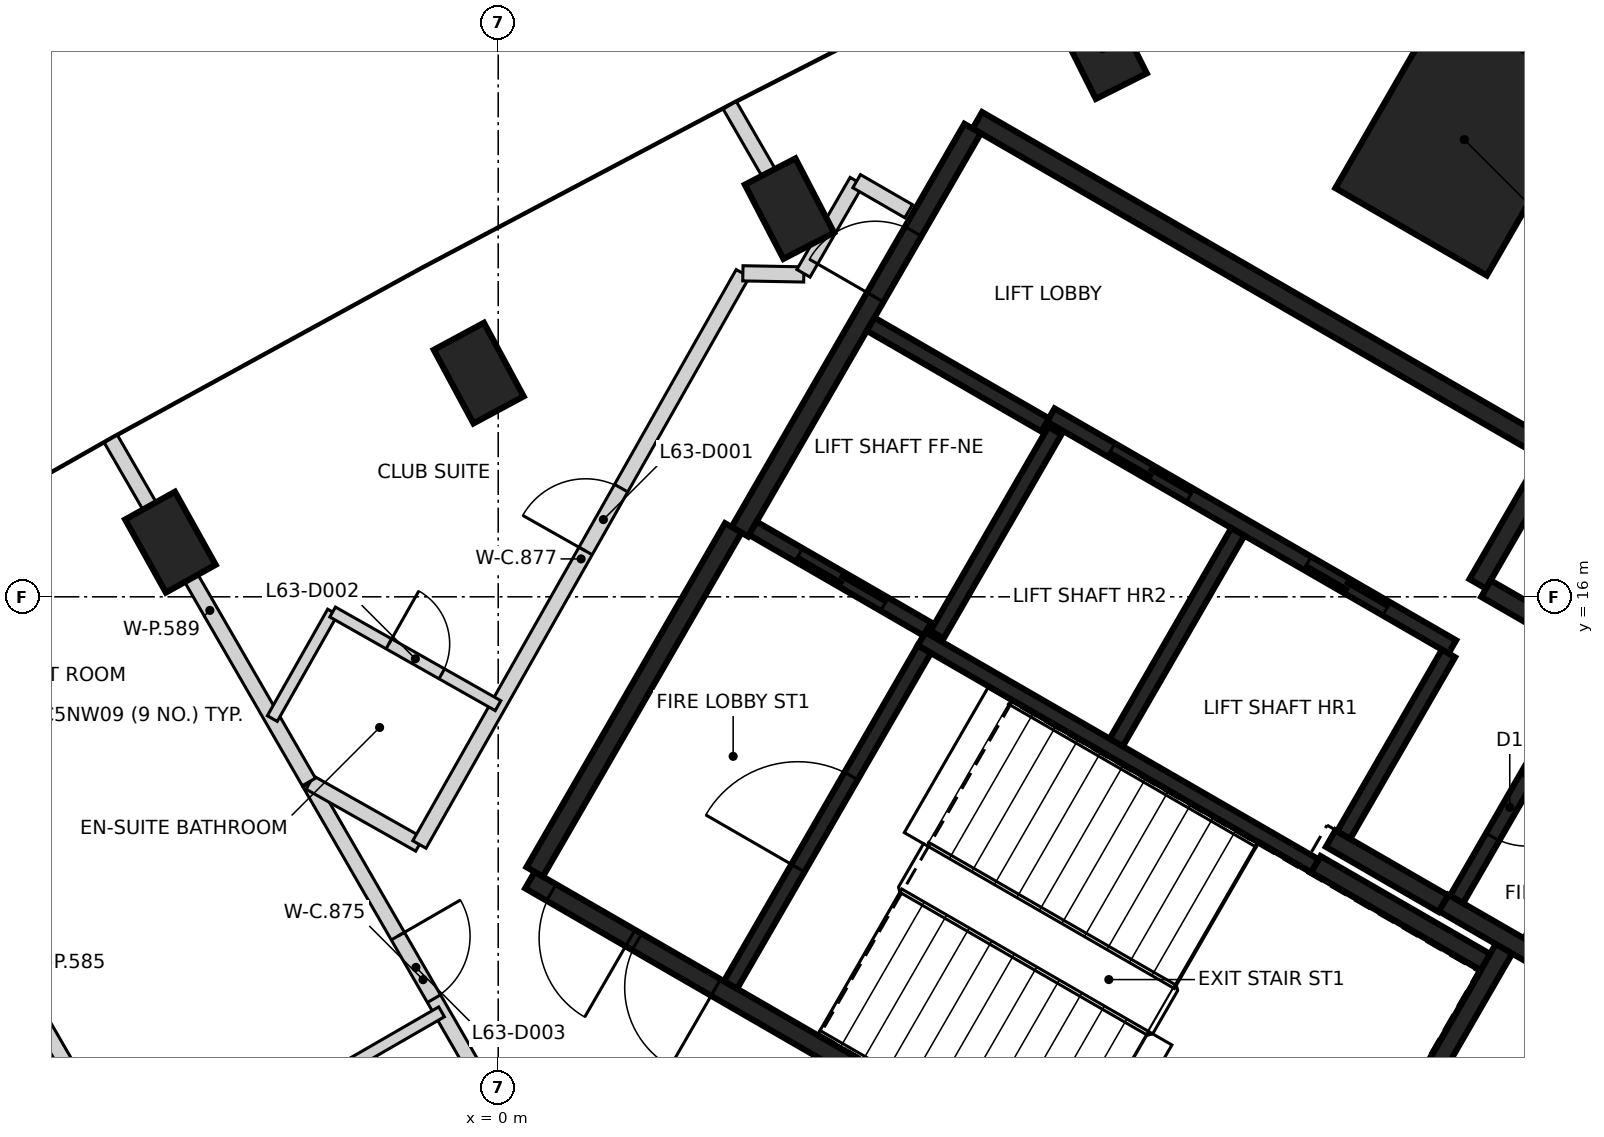
"""IFC4 building model, lengths in metres.
Left out: names, types, materials, properties, quantities, classifications, styles, units other than length and angle.
Written with IfcOpenShell. Run it as: python <this file> out.ifc"""

import sys

from ifc_helpers import new_model, si_unit, direction, frame, frame_2d, origin, origin_2d, place, context, subcontext, project, spatial, rectangle, extrude, element, fill, save


model = new_model("IFC4")
c1 = context("Model", 3, precision=1e-05, world=origin(), true_north=direction((0.0, 1.0)))
c2 = subcontext(c1, "Body", "Model", "MODEL_VIEW")
j1 = project(units=[si_unit("LENGTHUNIT", "METRE"), si_unit("PLANEANGLEUNIT", "RADIAN")], contexts=[c1])
p1 = place(None, origin())
s1 = spatial("IfcSite", under=j1, at=p1, CompositionType="ELEMENT")
p2 = place(p1, origin())
s2 = spatial("IfcBuilding", under=s1, at=p2, CompositionType="ELEMENT")
p3 = place(p2, frame((0.0, 0.0, 250.2)))
s3 = spatial("IfcBuildingStorey", under=s2, at=p3, CompositionType="ELEMENT", Elevation=250.2)
for number, where, z_axis, x_axis in (
    (1, (7.951, 23.211, -0.35), (0.0, 0.0, 1.0), (-0.449, 0.894, 0.0)),
    (2, (3.832, 21.107, -0.35), (0.0, 0.0, 1.0), (-0.461, 0.887, 0.0)),
    (3, (-0.256, 18.943, -0.35), (0.0, 0.0, 1.0), (-0.475, 0.88, 0.0)),
    (4, (-4.312, 16.719, -0.35), (0.0, 0.0, 1.0), (-0.487, 0.873, 0.0)),
):
    element("IfcColumn", number, at=place(p3, frame(where, z_axis=z_axis, x_axis=x_axis)), inside=s3, PredefinedType="COLUMN", context=c2, shape_type="SweptSolid", body=[
        extrude(rectangle(XDim=1.1, YDim=0.75, at=origin_2d()), origin(), (0.0, 0.0, 1.0), 3.6),
    ])
p4 = place(p3, frame((12.71, 22.015, -0.35), z_axis=(0.0, 0.0, 1.0), x_axis=(0.5, 0.866025403784, 0.0)))
e5 = element("IfcColumn", 5, at=p4, inside=s3, PredefinedType="COLUMN", context=c2, shape_type="SweptSolid", body=[
    extrude(rectangle(XDim=2.8, YDim=2.3, at=origin_2d()), origin(), (0.0, 0.0, 1.0), 3.6),
])
p5 = place(p3, frame((10.42, 6.498, 0.0), z_axis=(0.0, 0.0, 1.0), x_axis=(-0.866021906294, 0.500006057782, 0.0)))
e6 = element("IfcWall", 6, at=p5, inside=s3, PredefinedType="SHEAR", context=c2, shape_type="SweptSolid", body=[
    extrude(rectangle(XDim=11.55, YDim=0.25, at=frame_2d((5.775, 0.0))), origin(), (0.0, 0.0, 1.0), 3.25),
])
p6 = place(p5, frame((10.025, 0.0, 0.0)))
e7 = element("IfcOpeningElement", 7, at=p6, cuts=e6, PredefinedType="OPENING", context=c2, shape_type="SweptSolid", body=[
    extrude(rectangle(XDim=1.2, YDim=2.1, at=frame_2d((0.6, 1.05))), frame((0.0, 0.135, 0.0), z_axis=(0.0, -1.0, 0.0), x_axis=(1.0, 0.0, 0.0)), (0.0, 0.0, 1.0), 0.27),
])
p7 = place(p5, frame((8.725, 0.0, 0.0)))
e8 = element("IfcOpeningElement", 8, at=p7, cuts=e6, PredefinedType="OPENING", context=c2, shape_type="SweptSolid", body=[
    extrude(rectangle(XDim=1.2, YDim=2.1, at=frame_2d((0.6, 1.05))), frame((0.0, 0.135, 0.0), z_axis=(0.0, -1.0, 0.0), x_axis=(1.0, 0.0, 0.0)), (0.0, 0.0, 1.0), 0.27),
])
p8 = place(p3, frame((6.304, 22.269, 0.0), z_axis=(0.0, 0.0, 1.0), x_axis=(0.866022959057, -0.500004234368, 0.0)))
e9 = element("IfcWall", 9, at=p8, inside=s3, PredefinedType="SHEAR", context=c2, shape_type="SweptSolid", body=[
    extrude(rectangle(XDim=8.75, YDim=0.25, at=frame_2d((4.375, 0.0))), origin(), (0.0, 0.0, 1.0), 3.25),
])
p9 = place(p3, frame((3.179, 16.856, 0.0), z_axis=(0.0, 0.0, 1.0), x_axis=(0.500001955336, 0.866024274868, 0.0)))
e10 = element("IfcWall", 10, at=p9, inside=s3, PredefinedType="SHEAR", context=c2, shape_type="SweptSolid", body=[
    extrude(rectangle(XDim=6.125, YDim=0.25, at=frame_2d((3.062, 0.0))), origin(), (0.0, 0.0, 1.0), 3.25),
])
p10 = place(p9, frame((3.563, 0.0, 0.0)))
e11 = element("IfcOpeningElement", 11, at=p10, cuts=e10, PredefinedType="OPENING", context=c2, shape_type="SweptSolid", body=[
    extrude(rectangle(XDim=1.0, YDim=2.1, at=frame_2d((0.5, 1.05))), frame((0.0, 0.135, 0.0), z_axis=(0.0, -1.0, 0.0), x_axis=(1.0, 0.0, 0.0)), (0.0, 0.0, 1.0), 0.27),
])
p11 = place(p3, frame((0.48, 12.381, 0.0), z_axis=(0.0, 0.0, 1.0), x_axis=(0.49999885962, 0.866026062182, 0.0)))
e12 = element("IfcWall", 12, at=p11, inside=s3, PredefinedType="SHEAR", context=c2, shape_type="SweptSolid", body=[
    extrude(rectangle(XDim=5.225, YDim=0.25, at=frame_2d((2.612, 0.0))), origin(), (0.0, 0.0, 1.0), 3.25),
])
p12 = place(p3, frame((13.238, 11.378, 0.0), z_axis=(0.0, 0.0, 1.0), x_axis=(-0.500008851346, -0.866020293397, 0.0)))
e13 = element("IfcWall", 13, at=p12, inside=s3, PredefinedType="SHEAR", context=c2, shape_type="SweptSolid", body=[
    extrude(rectangle(XDim=5.51, YDim=0.25, at=frame_2d((2.755, 0.0))), origin(), (0.0, 0.0, 1.0), 3.25),
])
p13 = place(p3, frame((14.918, 10.54, 0.0), z_axis=(0.0, 0.0, 1.0), x_axis=(-0.866063538972, 0.499933942099, 0.0)))
e14 = element("IfcWall", 14, at=p13, inside=s3, PredefinedType="SHEAR", context=c2, shape_type="SweptSolid", body=[
    extrude(rectangle(XDim=2.865, YDim=0.25, at=frame_2d((1.432, 0.0))), origin(), (0.0, 0.0, 1.0), 3.25),
])
p14 = place(p3, frame((10.757, 12.481, 0.0), z_axis=(0.0, 0.0, 1.0), x_axis=(0.866022940537, -0.500004266446, 0.0)))
e15 = element("IfcWall", 15, at=p14, inside=s3, PredefinedType="SHEAR", context=c2, shape_type="SweptSolid", body=[
    extrude(rectangle(XDim=2.575, YDim=0.25, at=frame_2d((1.287, 0.0))), origin(), (0.0, 0.0, 1.0), 3.25),
])
p15 = place(p3, frame((13.819, 17.785, 0.0), z_axis=(0.0, 0.0, 1.0), x_axis=(-0.500039802285, -0.866002422705, 0.0)))
e16 = element("IfcWall", 16, at=p15, inside=s3, PredefinedType="SHEAR", context=c2, shape_type="SweptSolid", body=[
    extrude(rectangle(XDim=1.865, YDim=0.25, at=frame_2d((0.932, 0.0))), origin(), (0.0, 0.0, 1.0), 3.25),
])
p16 = place(p3, frame((12.433, 11.964, 0.0), z_axis=(0.0, 0.0, 1.0), x_axis=(-0.866038183914, 0.499977863513, 0.0)))
e17 = element("IfcWall", 17, at=p16, inside=s3, PredefinedType="SHEAR", context=c2, shape_type="SweptSolid", body=[
    extrude(rectangle(XDim=1.71, YDim=0.25, at=frame_2d((0.855, 0.0))), origin(), (0.0, 0.0, 1.0), 3.25),
])
p17 = place(p3, frame((12.995, 16.108, 0.0), z_axis=(0.0, 0.0, 1.0), x_axis=(0.866044474677, -0.49996696679, 0.0)))
e18 = element("IfcWall", 18, at=p17, inside=s3, PredefinedType="SHEAR", context=c2, shape_type="SweptSolid", body=[
    extrude(rectangle(XDim=1.584, YDim=0.25, at=frame_2d((0.792, 0.0))), origin(), (0.0, 0.0, 1.0), 3.25),
])
p18 = place(p3, frame((12.552, 15.342, 0.0), z_axis=(0.0, 0.0, 1.0), x_axis=(-0.866030299012, 0.499991521122, 0.0)))
e19 = element("IfcWall", 19, at=p18, inside=s3, PredefinedType="SHEAR", context=c2, shape_type="SweptSolid", body=[
    extrude(rectangle(XDim=6.1, YDim=0.2, at=frame_2d((3.05, 0.0))), origin(), (0.0, 0.0, 1.0), 3.25),
])
p19 = place(p18, frame((1.0, 0.0, 0.0)))
e20 = element("IfcOpeningElement", 20, at=p19, cuts=e19, PredefinedType="OPENING", context=c2, shape_type="SweptSolid", body=[
    extrude(rectangle(XDim=1.2, YDim=2.1, at=frame_2d((0.6, 1.05))), frame((0.0, 0.11, 0.0), z_axis=(0.0, -1.0, 0.0), x_axis=(1.0, 0.0, 0.0)), (0.0, 0.0, 1.0), 0.22),
])
p20 = place(p18, frame((3.982, 0.0, 0.0)))
e21 = element("IfcOpeningElement", 21, at=p20, cuts=e19, PredefinedType="OPENING", context=c2, shape_type="SweptSolid", body=[
    extrude(rectangle(XDim=1.2, YDim=2.1, at=frame_2d((0.6, 1.05))), frame((0.0, 0.11, 0.0), z_axis=(0.0, -1.0, 0.0), x_axis=(1.0, 0.0, 0.0)), (0.0, 0.0, 1.0), 0.22),
])
p21 = place(p3, frame((10.743, 12.46, 0.0), z_axis=(0.0, 0.0, 1.0), x_axis=(-0.866018848283, 0.500011354289, 0.0)))
e22 = element("IfcWall", 22, at=p21, inside=s3, PredefinedType="SHEAR", context=c2, shape_type="SweptSolid", body=[
    extrude(rectangle(XDim=5.974, YDim=0.2, at=frame_2d((2.987, 0.0))), origin(), (0.0, 0.0, 1.0), 3.25),
])
p22 = place(p3, frame((3.057, 10.895, 0.0), z_axis=(0.0, 0.0, 1.0), x_axis=(0.500027839223, 0.866009330205, 0.0)))
e23 = element("IfcWall", 23, at=p22, inside=s3, PredefinedType="SHEAR", context=c2, shape_type="SweptSolid", body=[
    extrude(rectangle(XDim=5.098, YDim=0.2, at=frame_2d((2.549, 0.0))), origin(), (0.0, 0.0, 1.0), 3.25),
])
p23 = place(p22, frame((1.774, 0.0, 0.0)))
e24 = element("IfcOpeningElement", 24, at=p23, cuts=e23, PredefinedType="OPENING", context=c2, shape_type="SweptSolid", body=[
    extrude(rectangle(XDim=1.4, YDim=2.1, at=frame_2d((0.7, 1.05))), frame((0.0, 0.11, 0.0), z_axis=(0.0, -1.0, 0.0), x_axis=(1.0, 0.0, 0.0)), (0.0, 0.0, 1.0), 0.22),
])
p24 = place(p3, frame((8.132, 14.084, 0.0), z_axis=(0.0, 0.0, 1.0), x_axis=(0.500030834389, 0.86600760081, 0.0)))
e25 = element("IfcWall", 25, at=p24, inside=s3, PredefinedType="SHEAR", context=c2, shape_type="SweptSolid", body=[
    extrude(rectangle(XDim=3.198, YDim=0.2, at=frame_2d((1.599, 0.0))), origin(), (0.0, 0.0, 1.0), 3.25),
])
p25 = place(p3, frame((14.008, 14.442, 0.0), z_axis=(0.0, 0.0, 1.0), x_axis=(-0.499986818241, -0.866033014143, 0.0)))
e26 = element("IfcWall", 26, at=p25, inside=s3, PredefinedType="SHEAR", context=c2, shape_type="SweptSolid", body=[
    extrude(rectangle(XDim=2.798, YDim=0.2, at=frame_2d((1.399, 0.0))), origin(), (0.0, 0.0, 1.0), 3.25),
])
p26 = place(p25, frame((0.949, 0.0, 0.0)))
e27 = element("IfcOpeningElement", 27, at=p26, cuts=e26, PredefinedType="OPENING", context=c2, shape_type="SweptSolid", body=[
    extrude(rectangle(XDim=0.9, YDim=2.1, at=frame_2d((0.45, 1.05))), frame((0.0, 0.11, 0.0), z_axis=(0.0, -1.0, 0.0), x_axis=(1.0, 0.0, 0.0)), (0.0, 0.0, 1.0), 0.22),
])
p27 = place(p3, frame((12.502, 15.255, 0.0), z_axis=(0.0, 0.0, 1.0), x_axis=(-0.499965018551, -0.866045599391, 0.0)))
e28 = element("IfcWall", 28, at=p27, inside=s3, PredefinedType="SHEAR", context=c2, shape_type="SweptSolid", body=[
    extrude(rectangle(XDim=2.759, YDim=0.2, at=frame_2d((1.379, 0.0))), origin(), (0.0, 0.0, 1.0), 3.25),
])
p28 = place(p3, frame((7.324, 18.187, 0.0), z_axis=(0.0, 0.0, 1.0), x_axis=(-0.499967891604, -0.866043940782, 0.0)))
e29 = element("IfcWall", 29, at=p28, inside=s3, PredefinedType="SHEAR", context=c2, shape_type="SweptSolid", body=[
    extrude(rectangle(XDim=3.1, YDim=0.2, at=frame_2d((1.55, 0.0))), origin(), (0.0, 0.0, 1.0), 3.25),
])
p29 = place(p3, frame((5.646, 15.576, 0.0), z_axis=(0.0, 0.0, 1.0), x_axis=(-0.866018407898, 0.500012117035, 0.0)))
e30 = element("IfcWall", 30, at=p29, inside=s3, PredefinedType="SHEAR", context=c2, shape_type="SweptSolid", body=[
    extrude(rectangle(XDim=2.651, YDim=0.2, at=frame_2d((1.325, 0.0))), origin(), (0.0, 0.0, 1.0), 3.25),
])
p30 = place(p29, frame((0.652, 0.0, 0.0)))
e31 = element("IfcOpeningElement", 31, at=p30, cuts=e30, PredefinedType="OPENING", context=c2, shape_type="SweptSolid", body=[
    extrude(rectangle(XDim=1.3, YDim=2.1, at=frame_2d((0.65, 1.05))), frame((0.0, 0.11, 0.0), z_axis=(0.0, -1.0, 0.0), x_axis=(1.0, 0.0, 0.0)), (0.0, 0.0, 1.0), 0.22),
])
p31 = place(p3, frame((7.196, 18.26, 0.0), z_axis=(0.0, 0.0, 1.0), x_axis=(-0.866018407898, 0.500012117035, 0.0)))
e32 = element("IfcWall", 32, at=p31, inside=s3, PredefinedType="SHEAR", context=c2, shape_type="SweptSolid", body=[
    extrude(rectangle(XDim=2.651, YDim=0.2, at=frame_2d((1.325, 0.0))), origin(), (0.0, 0.0, 1.0), 3.25),
])
p32 = place(p3, frame((-2.483, 13.551, 0.0), z_axis=(0.0, 0.0, 1.0), x_axis=(0.499878046143, -0.866095802429, 0.0)))
e33 = element("IfcWall", 33, at=p32, inside=s3, PredefinedType="PARTITIONING", context=c2, shape_type="SweptSolid", body=[
    extrude(rectangle(XDim=5.977, YDim=0.2, at=frame_2d((2.988, 0.0))), origin(), (0.0, 0.0, 1.0), 3.25),
])
p33 = place(p32, frame((2.327, 0.0, 0.0)))
e34 = element("IfcOpeningElement", 34, at=p33, cuts=e33, PredefinedType="OPENING", context=c2, shape_type="SweptSolid", body=[
    extrude(rectangle(XDim=0.95, YDim=2.1, at=frame_2d((0.475, 1.05))), frame((0.0, 0.11, 0.0), z_axis=(0.0, -1.0, 0.0), x_axis=(1.0, 0.0, 0.0)), (0.0, 0.0, 1.0), 0.22),
])
p34 = place(p3, frame((-2.478, 13.556, 0.0), z_axis=(0.0, 0.0, 1.0), x_axis=(0.870609500021, -0.491974692919, 0.0)))
e35 = element("IfcWall", 35, at=p34, inside=s3, PredefinedType="PARTITIONING", context=c2, shape_type="SweptSolid", body=[
    extrude(rectangle(XDim=1.656, YDim=0.2, at=frame_2d((0.828, 0.0))), origin(), (0.0, 0.0, 1.0), 3.25),
])
p35 = place(p3, frame((-1.037, 12.741, 0.0), z_axis=(0.0, 0.0, 1.0), x_axis=(0.492679417867, 0.870210888929, 0.0)))
e36 = element("IfcWall", 36, at=p35, inside=s3, PredefinedType="PARTITIONING", context=c2, shape_type="SweptSolid", body=[
    extrude(rectangle(XDim=8.636, YDim=0.2, at=frame_2d((4.318, 0.0))), origin(), (0.0, 0.0, 1.0), 3.25),
])
p36 = place(p35, frame((4.438, 0.0, 0.0)))
e37 = element("IfcOpeningElement", 37, at=p36, cuts=e36, PredefinedType="OPENING", context=c2, shape_type="SweptSolid", body=[
    extrude(rectangle(XDim=0.95, YDim=2.1, at=frame_2d((0.475, 1.05))), frame((0.0, 0.11, 0.0), z_axis=(0.0, -1.0, 0.0), x_axis=(1.0, 0.0, 0.0)), (0.0, 0.0, 1.0), 0.22),
])
p37 = place(p3, frame((3.219, 20.256, 0.0), z_axis=(0.0, 0.0, 1.0), x_axis=(0.999821939894, -0.018870307541, 0.0)))
e38 = element("IfcWall", 38, at=p37, inside=s3, PredefinedType="PARTITIONING", context=c2, shape_type="SweptSolid", body=[
    extrude(rectangle(XDim=0.802, YDim=0.2, at=frame_2d((0.401, 0.0))), origin(), (0.0, 0.0, 1.0), 3.25),
])
p38 = place(p3, frame((4.016, 20.256, 0.0), z_axis=(0.0, 0.0, 1.0), x_axis=(0.500135180047, 0.865947343479, 0.0)))
e39 = element("IfcWall", 39, at=p38, inside=s3, PredefinedType="PARTITIONING", context=c2, shape_type="SweptSolid", body=[
    extrude(rectangle(XDim=1.399, YDim=0.2, at=frame_2d((0.7, 0.0))), origin(), (0.0, 0.0, 1.0), 2.35),
])
p39 = place(p3, frame((4.716, 21.468, 0.0), z_axis=(0.0, 0.0, 1.0), x_axis=(0.865912682783, -0.500195187698, 0.0)))
e40 = element("IfcWall", 40, at=p39, inside=s3, PredefinedType="PARTITIONING", context=c2, shape_type="SweptSolid", body=[
    extrude(rectangle(XDim=0.79, YDim=0.2, at=frame_2d((0.395, 0.0))), origin(), (0.0, 0.0, 1.0), 2.35),
])
p40 = place(p3, frame((-9.119, 15.795, 0.0), z_axis=(0.0, 0.0, 1.0), x_axis=(0.500015176972, -0.866016641178, 0.0)))
e41 = element("IfcWall", 41, at=p40, inside=s3, PredefinedType="PARTITIONING", context=c2, shape_type="SweptSolid", body=[
    extrude(rectangle(XDim=11.239, YDim=0.2, at=frame_2d((5.619, 0.0))), origin(), (0.0, 0.0, 1.0), 3.25),
])
p41 = place(p3, frame((-5.097, 18.078, 0.0), z_axis=(0.0, 0.0, 1.0), x_axis=(0.499977898262, -0.866038163853, 0.0)))
e42 = element("IfcWall", 42, at=p41, inside=s3, PredefinedType="PARTITIONING", context=c2, shape_type="SweptSolid", body=[
    extrude(rectangle(XDim=5.212, YDim=0.2, at=frame_2d((2.606, 0.0))), origin(), (0.0, 0.0, 1.0), 3.25),
])
p42 = place(p3, frame((3.046, 22.466, 0.0), z_axis=(0.0, 0.0, 1.0), x_axis=(0.500078449558, -0.865980106173, 0.0)))
e43 = element("IfcWall", 43, at=p42, inside=s3, PredefinedType="PARTITIONING", context=c2, shape_type="SweptSolid", body=[
    extrude(rectangle(XDim=1.9, YDim=0.2, at=frame_2d((0.95, 0.0))), origin(), (0.0, 0.0, 1.0), 3.25),
])
p43 = place(p3, frame((-2.972, 14.398, 0.0), z_axis=(0.0, 0.0, 1.0), x_axis=(0.492741112884, 0.870175956732, 0.0)))
e44 = element("IfcWall", 44, at=p43, inside=s3, PredefinedType="PARTITIONING", context=c2, shape_type="SweptSolid", body=[
    extrude(rectangle(XDim=1.611, YDim=0.15, at=frame_2d((0.806, 0.0))), origin(), (0.0, 0.0, 1.0), 3.25),
])
p44 = place(p3, frame((-2.564, 9.49, 0.0), z_axis=(0.0, 0.0, 1.0), x_axis=(0.866038466041, 0.499977374825, 0.0)))
e45 = element("IfcWall", 45, at=p44, inside=s3, PredefinedType="PARTITIONING", context=c2, shape_type="SweptSolid", body=[
    extrude(rectangle(XDim=2.1, YDim=0.15, at=frame_2d((1.05, 0.0))), origin(), (0.0, 0.0, 1.0), 3.25),
])
p45 = place(p3, frame((-2.178, 15.8, 0.0), z_axis=(0.0, 0.0, 1.0), x_axis=(0.870218946292, -0.492665186019, 0.0)))
e46 = element("IfcWall", 46, at=p45, inside=s3, PredefinedType="PARTITIONING", context=c2, shape_type="SweptSolid", body=[
    extrude(rectangle(XDim=2.5, YDim=0.15, at=frame_2d((1.25, 0.0))), origin(), (0.0, 0.0, 1.0), 3.25),
])
p46 = place(p45, frame((0.85, 0.0, 0.0)))
e47 = element("IfcOpeningElement", 47, at=p46, cuts=e46, PredefinedType="OPENING", context=c2, shape_type="SweptSolid", body=[
    extrude(rectangle(XDim=0.8, YDim=2.1, at=frame_2d((0.4, 1.05))), frame((0.0, 0.085, 0.0), z_axis=(0.0, -1.0, 0.0), x_axis=(1.0, 0.0, 0.0)), (0.0, 0.0, 1.0), 0.17),
])
p47 = place(p30, origin())
e48 = element("IfcDoor", 48, at=p47, inside=s3, OperationType="SLIDING_TO_RIGHT", PredefinedType="DOOR", context=c2, shape_type="SweptSolid", body=[
    extrude(rectangle(XDim=1.3, YDim=2.1, at=frame_2d((0.65, 1.05))), frame((0.0, 0.025, 0.0), z_axis=(0.0, -1.0, 0.0), x_axis=(1.0, 0.0, 0.0)), (0.0, 0.0, 1.0), 0.05),
])
fill(e31, e48)
p48 = place(p19, origin())
e49 = element("IfcDoor", 49, at=p48, inside=s3, OperationType="DOUBLE_DOOR_SLIDING", PredefinedType="DOOR", context=c2, shape_type="SweptSolid", body=[
    extrude(rectangle(XDim=1.2, YDim=2.1, at=frame_2d((0.6, 1.05))), frame((0.0, 0.025, 0.0), z_axis=(0.0, -1.0, 0.0), x_axis=(1.0, 0.0, 0.0)), (0.0, 0.0, 1.0), 0.05),
])
fill(e20, e49)
p49 = place(p20, origin())
e50 = element("IfcDoor", 50, at=p49, inside=s3, OperationType="DOUBLE_DOOR_SLIDING", PredefinedType="DOOR", context=c2, shape_type="SweptSolid", body=[
    extrude(rectangle(XDim=1.2, YDim=2.1, at=frame_2d((0.6, 1.05))), frame((0.0, 0.025, 0.0), z_axis=(0.0, -1.0, 0.0), x_axis=(1.0, 0.0, 0.0)), (0.0, 0.0, 1.0), 0.05),
])
fill(e21, e50)
p50 = place(p10, origin())
e51 = element("IfcDoor", 51, at=p50, inside=s3, OperationType="SINGLE_SWING_LEFT", PredefinedType="DOOR", context=c2, shape_type="SweptSolid", body=[
    extrude(rectangle(XDim=1.0, YDim=2.1, at=frame_2d((0.5, 1.05))), frame((0.0, 0.025, 0.0), z_axis=(0.0, -1.0, 0.0), x_axis=(1.0, 0.0, 0.0)), (0.0, 0.0, 1.0), 0.05),
])
fill(e11, e51)
p51 = place(p6, origin())
e52 = element("IfcDoor", 52, at=p51, inside=s3, OperationType="SINGLE_SWING_LEFT", PredefinedType="DOOR", context=c2, shape_type="SweptSolid", body=[
    extrude(rectangle(XDim=1.2, YDim=2.1, at=frame_2d((0.6, 1.05))), frame((0.0, 0.025, 0.0), z_axis=(0.0, -1.0, 0.0), x_axis=(1.0, 0.0, 0.0)), (0.0, 0.0, 1.0), 0.05),
])
fill(e7, e52)
p52 = place(p7, origin())
e53 = element("IfcDoor", 53, at=p52, inside=s3, OperationType="SINGLE_SWING_RIGHT", PredefinedType="DOOR", context=c2, shape_type="SweptSolid", body=[
    extrude(rectangle(XDim=1.2, YDim=2.1, at=frame_2d((0.6, 1.05))), frame((0.0, 0.025, 0.0), z_axis=(0.0, -1.0, 0.0), x_axis=(1.0, 0.0, 0.0)), (0.0, 0.0, 1.0), 0.05),
])
fill(e8, e53)
p53 = place(p23, origin())
e54 = element("IfcDoor", 54, at=p53, inside=s3, OperationType="SINGLE_SWING_RIGHT", PredefinedType="DOOR", context=c2, shape_type="SweptSolid", body=[
    extrude(rectangle(XDim=1.4, YDim=2.1, at=frame_2d((0.7, 1.05))), frame((0.0, 0.025, 0.0), z_axis=(0.0, -1.0, 0.0), x_axis=(1.0, 0.0, 0.0)), (0.0, 0.0, 1.0), 0.05),
])
fill(e24, e54)
p54 = place(p26, origin())
e55 = element("IfcDoor", 55, at=p54, inside=s3, OperationType="SINGLE_SWING_LEFT", PredefinedType="DOOR", context=c2, shape_type="SweptSolid", body=[
    extrude(rectangle(XDim=0.9, YDim=2.1, at=frame_2d((0.45, 1.05))), frame((0.0, 0.025, 0.0), z_axis=(0.0, -1.0, 0.0), x_axis=(1.0, 0.0, 0.0)), (0.0, 0.0, 1.0), 0.05),
])
fill(e27, e55)
p55 = place(p36, origin())
e56 = element("IfcDoor", 56, at=p55, inside=s3, OperationType="SINGLE_SWING_LEFT", PredefinedType="DOOR", context=c2, shape_type="SweptSolid", body=[
    extrude(rectangle(XDim=0.95, YDim=2.1, at=frame_2d((0.475, 1.05))), frame((0.0, 0.025, 0.0), z_axis=(0.0, -1.0, 0.0), x_axis=(1.0, 0.0, 0.0)), (0.0, 0.0, 1.0), 0.05),
])
fill(e37, e56)
p56 = place(p46, origin())
e57 = element("IfcDoor", 57, at=p56, inside=s3, OperationType="SINGLE_SWING_LEFT", PredefinedType="DOOR", context=c2, shape_type="SweptSolid", body=[
    extrude(rectangle(XDim=0.8, YDim=2.1, at=frame_2d((0.4, 1.05))), frame((0.0, 0.025, 0.0), z_axis=(0.0, -1.0, 0.0), x_axis=(1.0, 0.0, 0.0)), (0.0, 0.0, 1.0), 0.05),
])
fill(e47, e57)
p57 = place(p33, frame((0.95, 0.0, 0.0), z_axis=(0.0, 0.0, 1.0), x_axis=(-1.0, 0.0, 0.0)))
e58 = element("IfcDoor", 58, at=p57, inside=s3, OperationType="SINGLE_SWING_LEFT", PredefinedType="DOOR", context=c2, shape_type="SweptSolid", body=[
    extrude(rectangle(XDim=0.95, YDim=2.1, at=frame_2d((0.475, 1.05))), frame((0.0, 0.025, 0.0), z_axis=(0.0, -1.0, 0.0), x_axis=(1.0, 0.0, 0.0)), (0.0, 0.0, 1.0), 0.05),
])
fill(e34, e58)
save(model, sys.argv[1])
